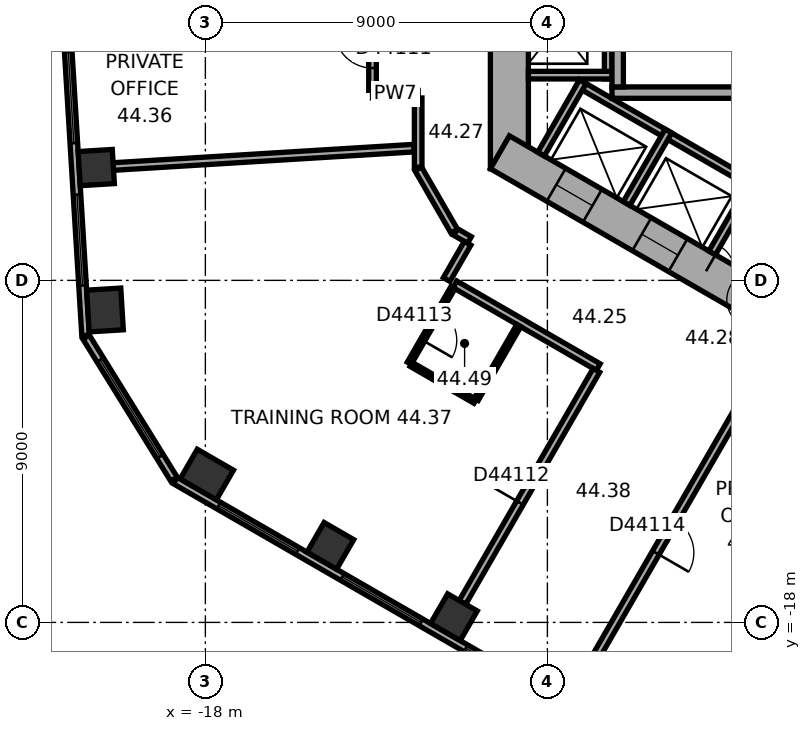
"""IFC4 building model, lengths in metres.
Left out: names, types, materials, properties, quantities, classifications, styles, units other than length and angle.
Written with IfcOpenShell. Run it as: python <this file> out.ifc"""

import sys

from ifc_helpers import new_model, si_unit, direction, frame, frame_2d, origin, origin_2d, place, context, subcontext, project, spatial, rectangle, extrude, element, fill, save


model = new_model("IFC4")
c1 = context("Model", 3, precision=1e-05, world=origin(), true_north=direction((0.0, 1.0)))
c2 = subcontext(c1, "Body", "Model", "MODEL_VIEW")
j1 = project(units=[si_unit("LENGTHUNIT", "METRE"), si_unit("PLANEANGLEUNIT", "RADIAN")], contexts=[c1])
p1 = place(None, origin())
s1 = spatial("IfcSite", under=j1, at=p1, CompositionType="ELEMENT")
p2 = place(p1, origin())
s2 = spatial("IfcBuilding", under=s1, at=p2, CompositionType="ELEMENT")
p3 = place(p2, frame((0.0, 0.0, 179.9)))
s3 = spatial("IfcBuildingStorey", under=s2, at=p3, CompositionType="ELEMENT", Elevation=179.9)
p4 = place(p3, frame((-20.871, -6.032, 0.0), z_axis=(0.0, 0.0, 1.0), x_axis=(0.061048539535, -0.998134798422, 0.0)))
e1 = element("IfcColumn", 1, at=p4, inside=s3, PredefinedType="COLUMN", context=c2, shape_type="SweptSolid", body=[
    extrude(rectangle(XDim=0.9, YDim=0.9, at=origin_2d()), origin(), (0.0, 0.0, 1.0), 3.7),
])
for number, where, z_axis, x_axis in (
    (2, (-20.642, -9.779, 0.0), (0.0, 0.0, 1.0), (0.061, -0.998, 0.0)),
    (3, (-17.962, -14.109, 0.0), (0.0, 0.0, 1.0), (0.866, -0.5, 0.0)),
):
    element("IfcColumn", number, at=place(p3, frame(where, z_axis=z_axis, x_axis=x_axis)), inside=s3, PredefinedType="COLUMN", context=c2, shape_type="SweptSolid", body=[
        extrude(rectangle(XDim=1.1, YDim=0.9, at=origin_2d()), origin(), (0.0, 0.0, 1.0), 3.7),
    ])
for number, where, z_axis, x_axis in (
    (4, (-14.711, -15.986, 0.0), (0.0, 0.0, 1.0), (0.866, -0.5, 0.0)),
    (5, (-11.46, -17.863, 0.0), (0.0, 0.0, 1.0), (0.866, -0.5, 0.0)),
):
    element("IfcColumn", number, at=place(p3, frame(where, z_axis=z_axis, x_axis=x_axis)), inside=s3, PredefinedType="COLUMN", context=c2, shape_type="SweptSolid", body=[
        extrude(rectangle(XDim=0.9, YDim=0.9, at=origin_2d()), origin(), (0.0, 0.0, 1.0), 3.7),
    ])
p5 = place(p3, frame((-10.0, 6.062, 0.0), z_axis=(0.0, 0.0, 1.0), x_axis=(0.0, -1.0, 0.0)))
e6 = element("IfcWall", 6, at=p5, inside=s3, PredefinedType="SHEAR", context=c2, shape_type="SweptSolid", body=[
    extrude(rectangle(XDim=12.125, YDim=1.0, at=frame_2d((6.062, 0.0))), origin(), (0.0, 0.0, 1.0), 3.7),
])
p6 = place(p5, frame((5.212, 0.0, 0.0)))
e7 = element("IfcOpeningElement", 7, at=p6, cuts=e6, PredefinedType="OPENING", context=c2, shape_type="SweptSolid", body=[
    extrude(rectangle(XDim=1.1, YDim=2.1, at=frame_2d((0.55, 1.05))), frame((0.0, 0.51, 0.0), z_axis=(0.0, -1.0, 0.0), x_axis=(1.0, 0.0, 0.0)), (0.0, 0.0, 1.0), 1.02),
])
p7 = place(p5, frame((7.812, 0.0, 0.0)))
e8 = element("IfcOpeningElement", 8, at=p7, cuts=e6, PredefinedType="OPENING", context=c2, shape_type="SweptSolid", body=[
    extrude(rectangle(XDim=1.1, YDim=2.1, at=frame_2d((0.55, 1.05))), frame((0.0, 0.51, 0.0), z_axis=(0.0, -1.0, 0.0), x_axis=(1.0, 0.0, 0.0)), (0.0, 0.0, 1.0), 1.02),
])
p8 = place(p3, frame((-10.25, -5.629, 0.0), z_axis=(0.0, 0.0, 1.0), x_axis=(0.866022616891, -0.50000482701, 0.0)))
e9 = element("IfcWall", 9, at=p8, inside=s3, PredefinedType="SHEAR", context=c2, shape_type="SweptSolid", body=[
    extrude(rectangle(XDim=12.125, YDim=1.0, at=frame_2d((6.062, 0.0))), origin(), (0.0, 0.0, 1.0), 3.7),
])
p9 = place(p8, frame((6.262, 0.0, 0.0)))
e10 = element("IfcOpeningElement", 10, at=p9, cuts=e9, PredefinedType="OPENING", context=c2, shape_type="SweptSolid", body=[
    extrude(rectangle(XDim=1.5, YDim=2.1, at=frame_2d((0.75, 1.05))), frame((0.0, 0.51, 0.0), z_axis=(0.0, -1.0, 0.0), x_axis=(1.0, 0.0, 0.0)), (0.0, 0.0, 1.0), 1.02),
])
p10 = place(p8, frame((1.712, 0.0, 0.0)))
e11 = element("IfcOpeningElement", 11, at=p10, cuts=e9, PredefinedType="OPENING", context=c2, shape_type="SweptSolid", body=[
    extrude(rectangle(XDim=1.1, YDim=2.1, at=frame_2d((0.55, 1.05))), frame((0.0, 0.51, 0.0), z_axis=(0.0, -1.0, 0.0), x_axis=(1.0, 0.0, 0.0)), (0.0, 0.0, 1.0), 1.02),
])
p11 = place(p8, frame((4.312, 0.0, 0.0)))
e12 = element("IfcOpeningElement", 12, at=p11, cuts=e9, PredefinedType="OPENING", context=c2, shape_type="SweptSolid", body=[
    extrude(rectangle(XDim=1.1, YDim=2.1, at=frame_2d((0.55, 1.05))), frame((0.0, 0.51, 0.0), z_axis=(0.0, -1.0, 0.0), x_axis=(1.0, 0.0, 0.0)), (0.0, 0.0, 1.0), 1.02),
])
p12 = place(p3, frame((-22.375, 9.557, 0.0), z_axis=(0.0, 0.0, 1.0), x_axis=(0.061036015339, -0.998135564356, 0.0)))
e13 = element("IfcWall", 13, at=p12, inside=s3, PredefinedType="STANDARD", context=c2, shape_type="SweptSolid", body=[
    extrude(rectangle(XDim=20.044, YDim=0.2, at=frame_2d((10.022, 0.0))), origin(), (0.0, 0.0, 1.0), 3.7),
])
p13 = place(p12, frame((1.313, 0.0, 0.9)))
e14 = element("IfcOpeningElement", 14, at=p13, cuts=e13, PredefinedType="OPENING", context=c2, shape_type="SweptSolid", body=[
    extrude(rectangle(XDim=2.4, YDim=2.0, at=frame_2d((1.2, 1.0))), frame((0.0, 0.11, 0.0), z_axis=(0.0, -1.0, 0.0), x_axis=(1.0, 0.0, 0.0)), (0.0, 0.0, 1.0), 0.22),
])
p14 = place(p12, frame((5.067, 0.0, 0.9)))
e15 = element("IfcOpeningElement", 15, at=p14, cuts=e13, PredefinedType="OPENING", context=c2, shape_type="SweptSolid", body=[
    extrude(rectangle(XDim=2.4, YDim=2.0, at=frame_2d((1.2, 1.0))), frame((0.0, 0.11, 0.0), z_axis=(0.0, -1.0, 0.0), x_axis=(1.0, 0.0, 0.0)), (0.0, 0.0, 1.0), 0.22),
])
p15 = place(p12, frame((8.821, 0.0, 0.9)))
e16 = element("IfcOpeningElement", 16, at=p15, cuts=e13, PredefinedType="OPENING", context=c2, shape_type="SweptSolid", body=[
    extrude(rectangle(XDim=2.4, YDim=2.0, at=frame_2d((1.2, 1.0))), frame((0.0, 0.11, 0.0), z_axis=(0.0, -1.0, 0.0), x_axis=(1.0, 0.0, 0.0)), (0.0, 0.0, 1.0), 0.22),
])
p16 = place(p12, frame((12.575, 0.0, 0.9)))
e17 = element("IfcOpeningElement", 17, at=p16, cuts=e13, PredefinedType="OPENING", context=c2, shape_type="SweptSolid", body=[
    extrude(rectangle(XDim=2.4, YDim=2.0, at=frame_2d((1.2, 1.0))), frame((0.0, 0.11, 0.0), z_axis=(0.0, -1.0, 0.0), x_axis=(1.0, 0.0, 0.0)), (0.0, 0.0, 1.0), 0.22),
])
p17 = place(p12, frame((16.329, 0.0, 0.9)))
e18 = element("IfcOpeningElement", 18, at=p17, cuts=e13, PredefinedType="OPENING", context=c2, shape_type="SweptSolid", body=[
    extrude(rectangle(XDim=2.4, YDim=2.0, at=frame_2d((1.2, 1.0))), frame((0.0, 0.11, 0.0), z_axis=(0.0, -1.0, 0.0), x_axis=(1.0, 0.0, 0.0)), (0.0, 0.0, 1.0), 0.22),
])
p18 = place(p3, frame((-21.137, -10.496, 0.0), z_axis=(0.0, 0.0, 1.0), x_axis=(0.526178661629, -0.850374044786, 0.0)))
e19 = element("IfcWall", 19, at=p18, inside=s3, PredefinedType="STANDARD", context=c2, shape_type="SweptSolid", body=[
    extrude(rectangle(XDim=4.395, YDim=0.2, at=frame_2d((2.197, 0.0))), origin(), (0.0, 0.0, 1.0), 3.7),
])
p19 = place(p18, frame((0.698, 0.0, 0.9)))
e20 = element("IfcOpeningElement", 20, at=p19, cuts=e19, PredefinedType="OPENING", context=c2, shape_type="SweptSolid", body=[
    extrude(rectangle(XDim=3.0, YDim=2.0, at=frame_2d((1.5, 1.0))), frame((0.0, 0.11, 0.0), z_axis=(0.0, -1.0, 0.0), x_axis=(1.0, 0.0, 0.0)), (0.0, 0.0, 1.0), 0.22),
])
p20 = place(p3, frame((-18.789, -14.267, 0.0), z_axis=(0.0, 0.0, 1.0), x_axis=(0.866023315909, -0.500003616288, 0.0)))
e21 = element("IfcWall", 21, at=p20, inside=s3, PredefinedType="STANDARD", context=c2, shape_type="SweptSolid", body=[
    extrude(rectangle(XDim=20.044, YDim=0.2, at=frame_2d((10.022, 0.0))), origin(), (0.0, 0.0, 1.0), 3.7),
])
p21 = place(p20, frame((1.314, 0.0, 0.9)))
e22 = element("IfcOpeningElement", 22, at=p21, cuts=e21, PredefinedType="OPENING", context=c2, shape_type="SweptSolid", body=[
    extrude(rectangle(XDim=2.4, YDim=2.0, at=frame_2d((1.2, 1.0))), frame((0.0, 0.11, 0.0), z_axis=(0.0, -1.0, 0.0), x_axis=(1.0, 0.0, 0.0)), (0.0, 0.0, 1.0), 0.22),
])
p22 = place(p20, frame((5.069, 0.0, 0.9)))
e23 = element("IfcOpeningElement", 23, at=p22, cuts=e21, PredefinedType="OPENING", context=c2, shape_type="SweptSolid", body=[
    extrude(rectangle(XDim=2.4, YDim=2.0, at=frame_2d((1.2, 1.0))), frame((0.0, 0.11, 0.0), z_axis=(0.0, -1.0, 0.0), x_axis=(1.0, 0.0, 0.0)), (0.0, 0.0, 1.0), 0.22),
])
p23 = place(p20, frame((8.823, 0.0, 0.9)))
e24 = element("IfcOpeningElement", 24, at=p23, cuts=e21, PredefinedType="OPENING", context=c2, shape_type="SweptSolid", body=[
    extrude(rectangle(XDim=2.4, YDim=2.0, at=frame_2d((1.2, 1.0))), frame((0.0, 0.11, 0.0), z_axis=(0.0, -1.0, 0.0), x_axis=(1.0, 0.0, 0.0)), (0.0, 0.0, 1.0), 0.22),
])
p24 = place(p20, frame((12.577, 0.0, 0.9)))
e25 = element("IfcOpeningElement", 25, at=p24, cuts=e21, PredefinedType="OPENING", context=c2, shape_type="SweptSolid", body=[
    extrude(rectangle(XDim=2.4, YDim=2.0, at=frame_2d((1.2, 1.0))), frame((0.0, 0.11, 0.0), z_axis=(0.0, -1.0, 0.0), x_axis=(1.0, 0.0, 0.0)), (0.0, 0.0, 1.0), 0.22),
])
p25 = place(p20, frame((16.331, 0.0, 0.9)))
e26 = element("IfcOpeningElement", 26, at=p25, cuts=e21, PredefinedType="OPENING", context=c2, shape_type="SweptSolid", body=[
    extrude(rectangle(XDim=2.4, YDim=2.0, at=frame_2d((1.2, 1.0))), frame((0.0, 0.11, 0.0), z_axis=(0.0, -1.0, 0.0), x_axis=(1.0, 0.0, 0.0)), (0.0, 0.0, 1.0), 0.22),
])
p26 = place(p3, frame((-7.4, 4.3, 0.0), z_axis=(0.0, 0.0, 1.0), x_axis=(0.0, -1.0, 0.0)))
e27 = element("IfcWall", 27, at=p26, inside=s3, PredefinedType="PARTITIONING", context=c2, shape_type="SweptSolid", body=[
    extrude(rectangle(XDim=8.0, YDim=0.2, at=frame_2d((4.0, 0.0))), origin(), (0.0, 0.0, 1.0), 3.42),
])
p27 = place(p3, frame((-7.3, -3.6, 0.0), z_axis=(0.0, 0.0, 1.0), x_axis=(-1.0, 0.0, 0.0)))
e28 = element("IfcWall", 28, at=p27, inside=s3, PredefinedType="PARTITIONING", context=c2, shape_type="SweptSolid", body=[
    extrude(rectangle(XDim=2.2, YDim=0.2, at=frame_2d((1.1, 0.0))), origin(), (0.0, 0.0, 1.0), 3.42),
])
p28 = place(p3, frame((-8.203, -3.809, 0.0), z_axis=(0.0, 0.0, 1.0), x_axis=(0.866028230842, -0.499995103361, 0.0)))
e29 = element("IfcWall", 29, at=p28, inside=s3, PredefinedType="PARTITIONING", context=c2, shape_type="SweptSolid", body=[
    extrude(rectangle(XDim=5.4, YDim=0.2, at=frame_2d((2.7, 0.0))), origin(), (0.0, 0.0, 1.0), 3.42),
])
for number, where, z_axis, x_axis in (
    (30, (-8.067, -3.772, 0.0), (0.0, 0.0, 1.0), (-0.5, -0.866, 0.0)),
    (31, (-5.815, -5.072, 0.0), (0.0, 0.0, 1.0), (-0.5, -0.866, 0.0)),
):
    element("IfcWall", number, at=place(p3, frame(where, z_axis=z_axis, x_axis=x_axis)), inside=s3, PredefinedType="PARTITIONING", context=c2, shape_type="SweptSolid", body=[
        extrude(rectangle(XDim=2.2, YDim=0.2, at=frame_2d((1.1, 0.0))), origin(), (0.0, 0.0, 1.0), 3.42),
    ])
p29 = place(p3, frame((-3.563, -6.372, 0.0), z_axis=(0.0, 0.0, 1.0), x_axis=(-0.499994660107, -0.866028486751, 0.0)))
e32 = element("IfcWall", 32, at=p29, inside=s3, PredefinedType="PARTITIONING", context=c2, shape_type="SweptSolid", body=[
    extrude(rectangle(XDim=2.2, YDim=0.2, at=frame_2d((1.1, 0.0))), origin(), (0.0, 0.0, 1.0), 3.42),
])
p30 = place(p3, frame((-2.6, -4.06, 0.0), z_axis=(0.0, 0.0, 1.0), x_axis=(-1.0, 0.0, 0.0)))
e33 = element("IfcWall", 33, at=p30, inside=s3, PredefinedType="SHEAR", context=c2, shape_type="SweptSolid", body=[
    extrude(rectangle(XDim=4.7, YDim=0.3, at=frame_2d((2.35, 0.0))), origin(), (0.0, 0.0, 1.0), 3.42),
])
p31 = place(p3, frame((-7.15, 3.15, 0.0), z_axis=(0.0, 0.0, 1.0), x_axis=(0.0, -1.0, 0.0)))
e34 = element("IfcWall", 34, at=p31, inside=s3, PredefinedType="SHEAR", context=c2, shape_type="SweptSolid", body=[
    extrude(rectangle(XDim=7.06, YDim=0.3, at=frame_2d((3.53, 0.0))), origin(), (0.0, 0.0, 1.0), 3.42),
])
p32 = place(p3, frame((-20.421, -6.005, 0.0), z_axis=(0.0, 0.0, 1.0), x_axis=(0.998134865741, 0.061047438866, 0.0)))
e35 = element("IfcWall", 35, at=p32, inside=s3, PredefinedType="PARTITIONING", context=c2, shape_type="SweptSolid", body=[
    extrude(rectangle(XDim=7.927, YDim=0.2, at=frame_2d((3.963, 0.0))), origin(), (0.0, 0.0, 1.0), 2.87),
])
p33 = place(p3, frame((-13.601, -4.101, 0.0), z_axis=(0.0, 0.0, 1.0), x_axis=(1.0, 0.0, 0.0)))
e36 = element("IfcWall", 36, at=p33, inside=s3, PredefinedType="PARTITIONING", context=c2, shape_type="SweptSolid", body=[
    extrude(rectangle(XDim=1.201, YDim=0.2, at=frame_2d((0.601, 0.0))), origin(), (0.0, 0.0, 1.0), 3.42),
])
p34 = place(p3, frame((-13.601, 2.101, 0.0), z_axis=(0.0, 0.0, 1.0), x_axis=(0.0, -1.0, 0.0)))
e37 = element("IfcWall", 37, at=p34, inside=s3, PredefinedType="PARTITIONING", context=c2, shape_type="SweptSolid", body=[
    extrude(rectangle(XDim=6.102, YDim=0.2, at=frame_2d((3.051, 0.0))), origin(), (0.0, 0.0, 1.0), 3.42),
])
p35 = place(p34, frame((4.515, 0.0, 0.0)))
e38 = element("IfcOpeningElement", 38, at=p35, cuts=e37, PredefinedType="OPENING", context=c2, shape_type="SweptSolid", body=[
    extrude(rectangle(XDim=1.0, YDim=2.1, at=frame_2d((0.5, 1.05))), frame((0.0, 0.11, 0.0), z_axis=(0.0, -1.0, 0.0), x_axis=(1.0, 0.0, 0.0)), (0.0, 0.0, 1.0), 0.22),
])
p36 = place(p3, frame((-12.635, -11.182, 0.0), z_axis=(0.0, 0.0, 1.0), x_axis=(0.499952165731, 0.866053019151, 0.0)))
e39 = element("IfcWall", 39, at=p36, inside=s3, PredefinedType="PARTITIONING", context=c2, shape_type="SweptSolid", body=[
    extrude(rectangle(XDim=2.3, YDim=0.12, at=frame_2d((1.15, 0.0))), origin(), (0.0, 0.0, 1.0), 3.42),
])
p37 = place(p36, frame((0.7, 0.0, 0.0)))
e40 = element("IfcOpeningElement", 40, at=p37, cuts=e39, PredefinedType="OPENING", context=c2, shape_type="SweptSolid", body=[
    extrude(rectangle(XDim=0.9, YDim=2.1, at=frame_2d((0.45, 1.05))), frame((0.0, 0.07, 0.0), z_axis=(0.0, -1.0, 0.0), x_axis=(1.0, 0.0, 0.0)), (0.0, 0.0, 1.0), 0.14),
])
p38 = place(p3, frame((-12.4, -6.062, 0.0), z_axis=(0.0, 0.0, 1.0), x_axis=(0.500022797313, -0.86601224135, 0.0)))
e41 = element("IfcWall", 41, at=p38, inside=s3, PredefinedType="PARTITIONING", context=c2, shape_type="SweptSolid", body=[
    extrude(rectangle(XDim=1.9, YDim=0.2, at=frame_2d((0.95, 0.0))), origin(), (0.0, 0.0, 1.0), 3.42),
])
p39 = place(p3, frame((-12.4, -4.201, 0.0), z_axis=(0.0, 0.0, 1.0), x_axis=(0.0, -1.0, 0.0)))
e42 = element("IfcWall", 42, at=p39, inside=s3, PredefinedType="PARTITIONING", context=c2, shape_type="SweptSolid", body=[
    extrude(rectangle(XDim=1.821, YDim=0.2, at=frame_2d((0.911, 0.0))), origin(), (0.0, 0.0, 1.0), 3.42),
])
p40 = place(p3, frame((-11.435, -9.103, 0.0), z_axis=(0.0, 0.0, 1.0), x_axis=(0.866007399799, -0.500031182522, 0.0)))
e43 = element("IfcWall", 43, at=p40, inside=s3, PredefinedType="PARTITIONING", context=c2, shape_type="SweptSolid", body=[
    extrude(rectangle(XDim=4.358, YDim=0.2, at=frame_2d((2.179, 0.0))), origin(), (0.0, 0.0, 1.0), 3.42),
])
p41 = place(p3, frame((-11.415, -7.728, 0.0), z_axis=(0.0, 0.0, 1.0), x_axis=(0.865915281873, -0.500190688257, 0.0)))
e44 = element("IfcWall", 44, at=p41, inside=s3, PredefinedType="PARTITIONING", context=c2, shape_type="SweptSolid", body=[
    extrude(rectangle(XDim=0.421, YDim=0.2, at=frame_2d((0.21, 0.0))), origin(), (0.0, 0.0, 1.0), 3.42),
])
p42 = place(p3, frame((-11.235, -17.474, 0.0), z_axis=(0.0, 0.0, 1.0), x_axis=(0.500009260695, 0.866020057054, 0.0)))
e45 = element("IfcWall", 45, at=p42, inside=s3, PredefinedType="PARTITIONING", context=c2, shape_type="SweptSolid", body=[
    extrude(rectangle(XDim=7.049, YDim=0.2, at=frame_2d((3.524, 0.0))), origin(), (0.0, 0.0, 1.0), 2.87),
])
p43 = place(p42, frame((3.024, 0.0, 0.0)))
e46 = element("IfcOpeningElement", 46, at=p43, cuts=e45, PredefinedType="OPENING", context=c2, shape_type="SweptSolid", body=[
    extrude(rectangle(XDim=1.0, YDim=2.1, at=frame_2d((0.5, 1.05))), frame((0.0, 0.11, 0.0), z_axis=(0.0, -1.0, 0.0), x_axis=(1.0, 0.0, 0.0)), (0.0, 0.0, 1.0), 0.22),
])
p44 = place(p3, frame((-11.101, -8.025, 0.0), z_axis=(0.0, 0.0, 1.0), x_axis=(-0.500074377092, -0.865982457891, 0.0)))
e47 = element("IfcWall", 47, at=p44, inside=s3, PredefinedType="PARTITIONING", context=c2, shape_type="SweptSolid", body=[
    extrude(rectangle(XDim=1.101, YDim=0.2, at=frame_2d((0.55, 0.0))), origin(), (0.0, 0.0, 1.0), 3.42),
])
p45 = place(p3, frame((-10.903, -12.182, 0.0), z_axis=(0.0, 0.0, 1.0), x_axis=(-0.866011626733, 0.500023861795, 0.0)))
e48 = element("IfcWall", 48, at=p45, inside=s3, PredefinedType="PARTITIONING", context=c2, shape_type="SweptSolid", body=[
    extrude(rectangle(XDim=1.94, YDim=0.12, at=frame_2d((0.97, 0.0))), origin(), (0.0, 0.0, 1.0), 3.42),
])
p46 = place(p3, frame((-9.753, -10.19, 0.0), z_axis=(0.0, 0.0, 1.0), x_axis=(-0.49994888933, -0.866054910533, 0.0)))
e49 = element("IfcWall", 49, at=p46, inside=s3, PredefinedType="PARTITIONING", context=c2, shape_type="SweptSolid", body=[
    extrude(rectangle(XDim=2.24, YDim=0.12, at=frame_2d((1.12, 0.0))), origin(), (0.0, 0.0, 1.0), 3.42),
])
p47 = place(p3, frame((-7.984, -19.351, 0.0), z_axis=(0.0, 0.0, 1.0), x_axis=(0.500010139422, 0.866019549707, 0.0)))
e50 = element("IfcWall", 50, at=p47, inside=s3, PredefinedType="PARTITIONING", context=c2, shape_type="SweptSolid", body=[
    extrude(rectangle(XDim=8.35, YDim=0.2, at=frame_2d((4.175, 0.0))), origin(), (0.0, 0.0, 1.0), 3.42),
])
p48 = place(p47, frame((3.675, 0.0, 0.0)))
e51 = element("IfcOpeningElement", 51, at=p48, cuts=e50, PredefinedType="OPENING", context=c2, shape_type="SweptSolid", body=[
    extrude(rectangle(XDim=1.0, YDim=2.1, at=frame_2d((0.5, 1.05))), frame((0.0, 0.11, 0.0), z_axis=(0.0, -1.0, 0.0), x_axis=(1.0, 0.0, 0.0)), (0.0, 0.0, 1.0), 0.22),
])
p49 = place(p3, frame((-4.732, -21.228, 0.0), z_axis=(0.0, 0.0, 1.0), x_axis=(0.500000843414, 0.866024916838, 0.0)))
e52 = element("IfcWall", 52, at=p49, inside=s3, PredefinedType="PARTITIONING", context=c2, shape_type="SweptSolid", body=[
    extrude(rectangle(XDim=8.452, YDim=0.2, at=frame_2d((4.226, 0.0))), origin(), (0.0, 0.0, 1.0), 3.42),
])
p50 = place(p16, origin())
e53 = element("IfcWindow", 53, at=p50, inside=s3, PartitioningType="SINGLE_PANEL", PredefinedType="WINDOW", context=c2, shape_type="SweptSolid", body=[
    extrude(rectangle(XDim=2.4, YDim=2.0, at=frame_2d((1.2, 1.0))), frame((0.0, 0.03, 0.0), z_axis=(0.0, -1.0, 0.0), x_axis=(1.0, 0.0, 0.0)), (0.0, 0.0, 1.0), 0.06),
])
fill(e17, e53)
p51 = place(p17, origin())
e54 = element("IfcWindow", 54, at=p51, inside=s3, PartitioningType="SINGLE_PANEL", PredefinedType="WINDOW", context=c2, shape_type="SweptSolid", body=[
    extrude(rectangle(XDim=2.4, YDim=2.0, at=frame_2d((1.2, 1.0))), frame((0.0, 0.03, 0.0), z_axis=(0.0, -1.0, 0.0), x_axis=(1.0, 0.0, 0.0)), (0.0, 0.0, 1.0), 0.06),
])
fill(e18, e54)
p52 = place(p19, origin())
e55 = element("IfcWindow", 55, at=p52, inside=s3, PartitioningType="SINGLE_PANEL", PredefinedType="WINDOW", context=c2, shape_type="SweptSolid", body=[
    extrude(rectangle(XDim=3.0, YDim=2.0, at=frame_2d((1.5, 1.0))), frame((0.0, 0.03, 0.0), z_axis=(0.0, -1.0, 0.0), x_axis=(1.0, 0.0, 0.0)), (0.0, 0.0, 1.0), 0.06),
])
fill(e20, e55)
p53 = place(p21, origin())
e56 = element("IfcWindow", 56, at=p53, inside=s3, PartitioningType="SINGLE_PANEL", PredefinedType="WINDOW", context=c2, shape_type="SweptSolid", body=[
    extrude(rectangle(XDim=2.4, YDim=2.0, at=frame_2d((1.2, 1.0))), frame((0.0, 0.03, 0.0), z_axis=(0.0, -1.0, 0.0), x_axis=(1.0, 0.0, 0.0)), (0.0, 0.0, 1.0), 0.06),
])
fill(e22, e56)
p54 = place(p22, origin())
e57 = element("IfcWindow", 57, at=p54, inside=s3, PartitioningType="SINGLE_PANEL", PredefinedType="WINDOW", context=c2, shape_type="SweptSolid", body=[
    extrude(rectangle(XDim=2.4, YDim=2.0, at=frame_2d((1.2, 1.0))), frame((0.0, 0.03, 0.0), z_axis=(0.0, -1.0, 0.0), x_axis=(1.0, 0.0, 0.0)), (0.0, 0.0, 1.0), 0.06),
])
fill(e23, e57)
p55 = place(p23, origin())
e58 = element("IfcWindow", 58, at=p55, inside=s3, PartitioningType="SINGLE_PANEL", PredefinedType="WINDOW", context=c2, shape_type="SweptSolid", body=[
    extrude(rectangle(XDim=2.4, YDim=2.0, at=frame_2d((1.2, 1.0))), frame((0.0, 0.03, 0.0), z_axis=(0.0, -1.0, 0.0), x_axis=(1.0, 0.0, 0.0)), (0.0, 0.0, 1.0), 0.06),
])
fill(e24, e58)
p56 = place(p9, origin())
e59 = element("IfcDoor", 59, at=p56, inside=s3, OperationType="DOUBLE_DOOR_SINGLE_SWING", PredefinedType="DOOR", context=c2, shape_type="SweptSolid", body=[
    extrude(rectangle(XDim=1.5, YDim=2.1, at=frame_2d((0.75, 1.05))), frame((0.0, 0.025, 0.0), z_axis=(0.0, -1.0, 0.0), x_axis=(1.0, 0.0, 0.0)), (0.0, 0.0, 1.0), 0.05),
])
fill(e10, e59)
p57 = place(p10, origin())
e60 = element("IfcDoor", 60, at=p57, inside=s3, OperationType="DOUBLE_DOOR_SLIDING", PredefinedType="DOOR", context=c2, shape_type="SweptSolid", body=[
    extrude(rectangle(XDim=1.1, YDim=2.1, at=frame_2d((0.55, 1.05))), frame((0.0, 0.025, 0.0), z_axis=(0.0, -1.0, 0.0), x_axis=(1.0, 0.0, 0.0)), (0.0, 0.0, 1.0), 0.05),
])
fill(e11, e60)
p58 = place(p11, origin())
e61 = element("IfcDoor", 61, at=p58, inside=s3, OperationType="DOUBLE_DOOR_SLIDING", PredefinedType="DOOR", context=c2, shape_type="SweptSolid", body=[
    extrude(rectangle(XDim=1.1, YDim=2.1, at=frame_2d((0.55, 1.05))), frame((0.0, 0.025, 0.0), z_axis=(0.0, -1.0, 0.0), x_axis=(1.0, 0.0, 0.0)), (0.0, 0.0, 1.0), 0.05),
])
fill(e12, e61)
p59 = place(p35, origin())
e62 = element("IfcDoor", 62, at=p59, inside=s3, OperationType="SINGLE_SWING_LEFT", PredefinedType="DOOR", context=c2, shape_type="SweptSolid", body=[
    extrude(rectangle(XDim=1.0, YDim=2.1, at=frame_2d((0.5, 1.05))), frame((0.0, 0.025, 0.0), z_axis=(0.0, -1.0, 0.0), x_axis=(1.0, 0.0, 0.0)), (0.0, 0.0, 1.0), 0.05),
])
fill(e38, e62)
p60 = place(p43, origin())
e63 = element("IfcDoor", 63, at=p60, inside=s3, OperationType="SINGLE_SWING_LEFT", PredefinedType="DOOR", context=c2, shape_type="SweptSolid", body=[
    extrude(rectangle(XDim=1.0, YDim=2.1, at=frame_2d((0.5, 1.05))), frame((0.0, 0.025, 0.0), z_axis=(0.0, -1.0, 0.0), x_axis=(1.0, 0.0, 0.0)), (0.0, 0.0, 1.0), 0.05),
])
fill(e46, e63)
p61 = place(p37, origin())
e64 = element("IfcDoor", 64, at=p61, inside=s3, OperationType="SINGLE_SWING_LEFT", PredefinedType="DOOR", context=c2, shape_type="SweptSolid", body=[
    extrude(rectangle(XDim=0.9, YDim=2.1, at=frame_2d((0.45, 1.05))), frame((0.0, 0.025, 0.0), z_axis=(0.0, -1.0, 0.0), x_axis=(1.0, 0.0, 0.0)), (0.0, 0.0, 1.0), 0.05),
])
fill(e40, e64)
p62 = place(p48, origin())
e65 = element("IfcDoor", 65, at=p62, inside=s3, OperationType="SINGLE_SWING_LEFT", PredefinedType="DOOR", context=c2, shape_type="SweptSolid", body=[
    extrude(rectangle(XDim=1.0, YDim=2.1, at=frame_2d((0.5, 1.05))), frame((0.0, 0.025, 0.0), z_axis=(0.0, -1.0, 0.0), x_axis=(1.0, 0.0, 0.0)), (0.0, 0.0, 1.0), 0.05),
])
fill(e51, e65)
save(model, sys.argv[1])
